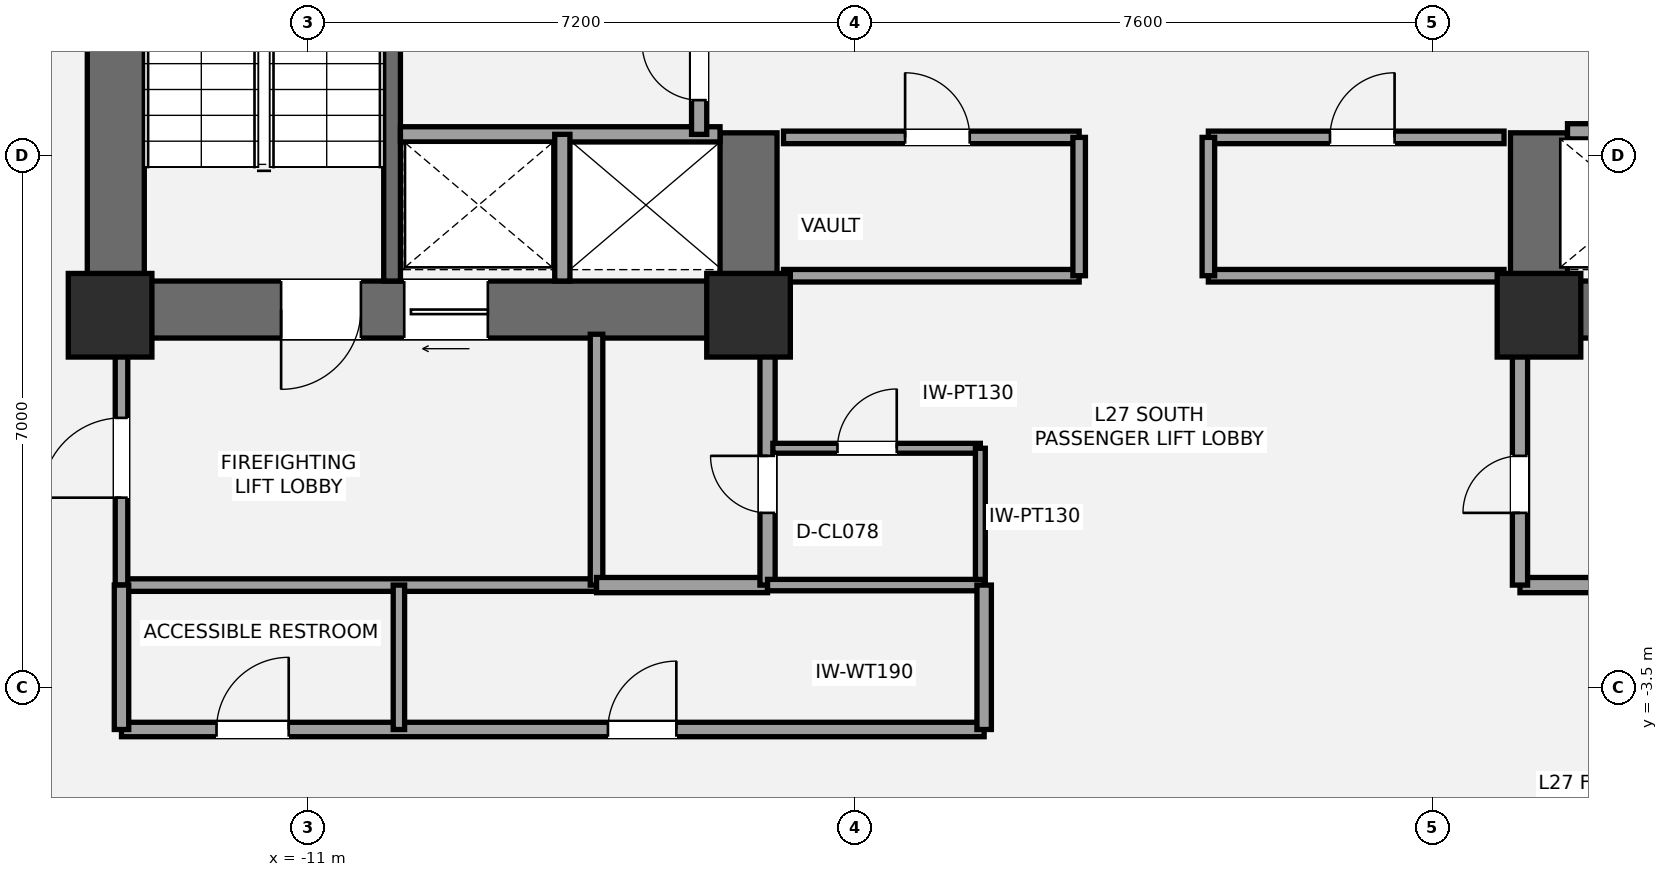
"""IFC4 building model, lengths in metres.
Left out: names, types, materials, properties, quantities, classifications, styles, units other than length and angle.
Written with IfcOpenShell. Run it as: python <this file> out.ifc"""

import sys

from ifc_helpers import new_model, si_unit, direction, frame, frame_2d, origin, origin_2d, place, context, subcontext, project, spatial, rectangle, extrude, element, fill, save


model = new_model("IFC4")
c1 = context("Model", 3, precision=1e-05, world=origin(), true_north=direction((0.0, 1.0)))
c2 = subcontext(c1, "Body", "Model", "MODEL_VIEW")
j1 = project(units=[si_unit("LENGTHUNIT", "METRE"), si_unit("PLANEANGLEUNIT", "RADIAN")], contexts=[c1])
p1 = place(None, origin())
s1 = spatial("IfcSite", under=j1, at=p1, CompositionType="ELEMENT")
p2 = place(p1, origin())
s2 = spatial("IfcBuilding", under=s1, at=p2, CompositionType="ELEMENT")
p3 = place(p2, frame((0.0, 0.0, 103.6)))
s3 = spatial("IfcBuildingStorey", under=s2, at=p3, CompositionType="ELEMENT", Elevation=103.6)
p4 = place(p3, frame((-13.525, 1.1, 0.0), z_axis=(0.0, 0.0, 1.0), x_axis=(0.0, 1.0, 0.0)))
e1 = element("IfcWall", 1, at=p4, inside=s3, PredefinedType="SHEAR", context=c2, shape_type="SweptSolid", body=[
    extrude(rectangle(XDim=8.65, YDim=0.75, at=frame_2d((4.325, 0.0))), origin(), (0.0, 0.0, 1.0), 3.5),
])
p5 = place(p3, frame((-4.825, 1.475, 0.0), z_axis=(0.0, 0.0, 1.0), x_axis=(-1.0, 0.0, 0.0)))
e2 = element("IfcWall", 2, at=p5, inside=s3, PredefinedType="SHEAR", context=c2, shape_type="SweptSolid", body=[
    extrude(rectangle(XDim=9.075, YDim=0.75, at=frame_2d((4.538, 0.0))), origin(), (0.0, 0.0, 1.0), 3.5),
])
p6 = place(p5, frame((5.475, 0.0, 0.0)))
e3 = element("IfcOpeningElement", 3, at=p6, cuts=e2, PredefinedType="OPENING", context=c2, shape_type="SweptSolid", body=[
    extrude(rectangle(XDim=1.05, YDim=2.15, at=frame_2d((0.525, 1.075))), frame((0.0, 0.385, 0.0), z_axis=(0.0, -1.0, 0.0), x_axis=(1.0, 0.0, 0.0)), (0.0, 0.0, 1.0), 0.77),
])
p7 = place(p5, frame((3.805, 0.0, 0.0)))
e4 = element("IfcOpeningElement", 4, at=p7, cuts=e2, PredefinedType="OPENING", context=c2, shape_type="SweptSolid", body=[
    extrude(rectangle(XDim=1.1, YDim=2.2, at=frame_2d((0.55, 1.1))), frame((0.0, 0.385, 0.0), z_axis=(0.0, -1.0, 0.0), x_axis=(1.0, 0.0, 0.0)), (0.0, 0.0, 1.0), 0.77),
])
p8 = place(p3, frame((-5.2, 1.1, 0.0), z_axis=(0.0, 0.0, 1.0), x_axis=(0.0, 1.0, 0.0)))
e5 = element("IfcWall", 5, at=p8, inside=s3, PredefinedType="SHEAR", context=c2, shape_type="SweptSolid", body=[
    extrude(rectangle(XDim=2.7, YDim=0.75, at=frame_2d((1.35, 0.0))), origin(), (0.0, 0.0, 1.0), 3.5),
])
p9 = place(p3, frame((-9.89, 1.85, 0.0), z_axis=(0.0, 0.0, 1.0), x_axis=(0.0, 1.0, 0.0)))
e6 = element("IfcWall", 6, at=p9, inside=s3, PredefinedType="SHEAR", context=c2, shape_type="SweptSolid", body=[
    extrude(rectangle(XDim=7.15, YDim=0.22, at=frame_2d((3.575, 0.0))), origin(), (0.0, 0.0, 1.0), 3.5),
])
p10 = place(p3, frame((13.9, 1.475, 0.0), z_axis=(0.0, 0.0, 1.0), x_axis=(-1.0, 0.0, 0.0)))
e7 = element("IfcWall", 7, at=p10, inside=s3, PredefinedType="SHEAR", context=c2, shape_type="SweptSolid", body=[
    extrude(rectangle(XDim=9.075, YDim=0.75, at=frame_2d((4.538, 0.0))), origin(), (0.0, 0.0, 1.0), 3.5),
])
p11 = place(p10, frame((2.55, 0.0, 0.0)))
e8 = element("IfcOpeningElement", 8, at=p11, cuts=e7, PredefinedType="OPENING", context=c2, shape_type="SweptSolid", body=[
    extrude(rectangle(XDim=1.05, YDim=2.15, at=frame_2d((0.525, 1.075))), frame((0.0, 0.385, 0.0), z_axis=(0.0, -1.0, 0.0), x_axis=(1.0, 0.0, 0.0)), (0.0, 0.0, 1.0), 0.77),
])
p12 = place(p10, frame((4.55, 0.0, 0.0)))
e9 = element("IfcOpeningElement", 9, at=p12, cuts=e7, PredefinedType="OPENING", context=c2, shape_type="SweptSolid", body=[
    extrude(rectangle(XDim=1.1, YDim=2.2, at=frame_2d((0.55, 1.1))), frame((0.0, 0.385, 0.0), z_axis=(0.0, -1.0, 0.0), x_axis=(1.0, 0.0, 0.0)), (0.0, 0.0, 1.0), 0.77),
])
p13 = place(p3, frame((5.2, 1.1, 0.0), z_axis=(0.0, 0.0, 1.0), x_axis=(0.0, 1.0, 0.0)))
e10 = element("IfcWall", 10, at=p13, inside=s3, PredefinedType="SHEAR", context=c2, shape_type="SweptSolid", body=[
    extrude(rectangle(XDim=2.7, YDim=0.75, at=frame_2d((1.35, 0.0))), origin(), (0.0, 0.0, 1.0), 3.5),
])
for number, where, z_axis, x_axis in (
    (11, (-13.6, 1.4, 0.0), (0.0, 0.0, 1.0), (1.0, 0.0, 0.0)),
    (12, (-5.2, 1.4, 0.0), (0.0, 0.0, 1.0), (1.0, 0.0, 0.0)),
    (13, (5.2, 1.4, 0.0), (0.0, 0.0, 1.0), (1.0, 0.0, 0.0)),
):
    element("IfcColumn", number, at=place(p3, frame(where, z_axis=z_axis, x_axis=x_axis)), inside=s3, PredefinedType="COLUMN", context=c2, shape_type="SweptSolid", body=[
        extrude(rectangle(XDim=1.1, YDim=1.1, at=origin_2d()), origin(), (0.0, 0.0, 1.0), 3.5),
    ])
p14 = place(p3, frame((-13.45, -2.15, 0.0), z_axis=(0.0, 0.0, 1.0), x_axis=(1.0, 0.0, 0.0)))
e14 = element("IfcWall", 14, at=p14, inside=s3, PredefinedType="PARTITIONING", context=c2, shape_type="SweptSolid", body=[
    extrude(rectangle(XDim=6.25, YDim=0.165, at=frame_2d((3.125, 0.0))), origin(), (0.0, 0.0, 1.0), 2.763),
])
p15 = place(p3, frame((-13.45, -2.15, 0.0), z_axis=(0.0, 0.0, 1.0), x_axis=(0.0, 1.0, 0.0)))
e15 = element("IfcWall", 15, at=p15, inside=s3, PredefinedType="PARTITIONING", context=c2, shape_type="SweptSolid", body=[
    extrude(rectangle(XDim=3.3, YDim=0.165, at=frame_2d((1.65, 0.0))), origin(), (0.0, 0.0, 1.0), 2.763),
])
p16 = place(p15, frame((1.15, 0.0, 0.0)))
e16 = element("IfcOpeningElement", 16, at=p16, cuts=e15, PredefinedType="OPENING", context=c2, shape_type="SweptSolid", body=[
    extrude(rectangle(XDim=1.05, YDim=2.15, at=frame_2d((0.525, 1.075))), frame((0.0, 0.093, 0.0), z_axis=(0.0, -1.0, 0.0), x_axis=(1.0, 0.0, 0.0)), (0.0, 0.0, 1.0), 0.185),
])
p17 = place(p3, frame((-7.2, -2.15, 0.0), z_axis=(0.0, 0.0, 1.0), x_axis=(0.0, 1.0, 0.0)))
e17 = element("IfcWall", 17, at=p17, inside=s3, PredefinedType="PARTITIONING", context=c2, shape_type="SweptSolid", body=[
    extrude(rectangle(XDim=3.3, YDim=0.165, at=frame_2d((1.65, 0.0))), origin(), (0.0, 0.0, 1.0), 2.763),
])
p18 = place(p3, frame((-7.2, -2.15, 0.0), z_axis=(0.0, 0.0, 1.0), x_axis=(1.0, 0.0, 0.0)))
e18 = element("IfcWall", 18, at=p18, inside=s3, PredefinedType="SOLIDWALL", context=c2, shape_type="SweptSolid", body=[
    extrude(rectangle(XDim=2.25, YDim=0.2, at=frame_2d((1.125, 0.0))), origin(), (0.0, 0.0, 1.0), 2.763),
])
p19 = place(p3, frame((-4.95, -2.15, 0.0), z_axis=(0.0, 0.0, 1.0), x_axis=(0.0, 1.0, 0.0)))
e19 = element("IfcWall", 19, at=p19, inside=s3, PredefinedType="SOLIDWALL", context=c2, shape_type="SweptSolid", body=[
    extrude(rectangle(XDim=3.3, YDim=0.2, at=frame_2d((1.65, 0.0))), origin(), (0.0, 0.0, 1.0), 2.763),
])
p20 = place(p19, frame((0.95, 0.0, 0.0)))
e20 = element("IfcOpeningElement", 20, at=p20, cuts=e19, PredefinedType="OPENING", context=c2, shape_type="SweptSolid", body=[
    extrude(rectangle(XDim=0.75, YDim=2.1, at=frame_2d((0.375, 1.05))), frame((0.0, 0.11, 0.0), z_axis=(0.0, -1.0, 0.0), x_axis=(1.0, 0.0, 0.0)), (0.0, 0.0, 1.0), 0.22),
])
p21 = place(p3, frame((4.95, -2.15, 0.0), z_axis=(0.0, 0.0, 1.0), x_axis=(1.0, 0.0, 0.0)))
e21 = element("IfcWall", 21, at=p21, inside=s3, PredefinedType="SOLIDWALL", context=c2, shape_type="SweptSolid", body=[
    extrude(rectangle(XDim=2.25, YDim=0.2, at=frame_2d((1.125, 0.0))), origin(), (0.0, 0.0, 1.0), 2.763),
])
p22 = place(p3, frame((4.95, -2.15, 0.0), z_axis=(0.0, 0.0, 1.0), x_axis=(0.0, 1.0, 0.0)))
e22 = element("IfcWall", 22, at=p22, inside=s3, PredefinedType="SOLIDWALL", context=c2, shape_type="SweptSolid", body=[
    extrude(rectangle(XDim=3.3, YDim=0.2, at=frame_2d((1.65, 0.0))), origin(), (0.0, 0.0, 1.0), 3.31),
])
p23 = place(p22, frame((0.95, 0.0, 0.0)))
e23 = element("IfcOpeningElement", 23, at=p23, cuts=e22, PredefinedType="OPENING", context=c2, shape_type="SweptSolid", body=[
    extrude(rectangle(XDim=0.75, YDim=2.1, at=frame_2d((0.375, 1.05))), frame((0.0, 0.11, 0.0), z_axis=(0.0, -1.0, 0.0), x_axis=(1.0, 0.0, 0.0)), (0.0, 0.0, 1.0), 0.22),
])
p24 = place(p3, frame((-4.88, -0.35, 0.0), z_axis=(0.0, 0.0, 1.0), x_axis=(1.0, 0.0, 0.0)))
e24 = element("IfcWall", 24, at=p24, inside=s3, PredefinedType="PARTITIONING", context=c2, shape_type="SweptSolid", body=[
    extrude(rectangle(XDim=2.73, YDim=0.13, at=frame_2d((1.365, 0.0))), origin(), (0.0, 0.0, 1.0), 2.763),
])
p25 = place(p24, frame((0.85, 0.0, 0.0)))
e25 = element("IfcOpeningElement", 25, at=p25, cuts=e24, PredefinedType="OPENING", context=c2, shape_type="SweptSolid", body=[
    extrude(rectangle(XDim=0.78, YDim=2.1, at=frame_2d((0.39, 1.05))), frame((0.0, 0.075, 0.0), z_axis=(0.0, -1.0, 0.0), x_axis=(1.0, 0.0, 0.0)), (0.0, 0.0, 1.0), 0.15),
])
p26 = place(p3, frame((-2.15, -2.15, 0.0), z_axis=(0.0, 0.0, 1.0), x_axis=(0.0, 1.0, 0.0)))
e26 = element("IfcWall", 26, at=p26, inside=s3, PredefinedType="PARTITIONING", context=c2, shape_type="SweptSolid", body=[
    extrude(rectangle(XDim=1.8, YDim=0.13, at=frame_2d((0.9, 0.0))), origin(), (0.0, 0.0, 1.0), 3.31),
])
p27 = place(p3, frame((-9.78, 3.78, 0.0), z_axis=(0.0, 0.0, 1.0), x_axis=(1.0, 0.0, 0.0)))
e27 = element("IfcWall", 27, at=p27, inside=s3, PredefinedType="SOLIDWALL", context=c2, shape_type="SweptSolid", body=[
    extrude(rectangle(XDim=4.205, YDim=0.2, at=frame_2d((2.103, 0.0))), origin(), (0.0, 0.0, 1.0), 3.31),
])
p28 = place(p3, frame((-7.65, 1.85, 0.0), z_axis=(0.0, 0.0, 1.0), x_axis=(0.0, 1.0, 0.0)))
e28 = element("IfcWall", 28, at=p28, inside=s3, PredefinedType="SOLIDWALL", context=c2, shape_type="SweptSolid", body=[
    extrude(rectangle(XDim=1.93, YDim=0.2, at=frame_2d((0.965, 0.0))), origin(), (0.0, 0.0, 1.0), 3.31),
])
p29 = place(p3, frame((-5.85, 3.78, 0.0), z_axis=(0.0, 0.0, 1.0), x_axis=(0.0, 1.0, 0.0)))
e29 = element("IfcWall", 29, at=p29, inside=s3, PredefinedType="SOLIDWALL", context=c2, shape_type="SweptSolid", body=[
    extrude(rectangle(XDim=1.69, YDim=0.2, at=frame_2d((0.845, 0.0))), origin(), (0.0, 0.0, 1.0), 3.31),
])
p30 = place(p29, frame((0.45, 0.0, 0.0)))
e30 = element("IfcOpeningElement", 30, at=p30, cuts=e29, PredefinedType="OPENING", context=c2, shape_type="SweptSolid", body=[
    extrude(rectangle(XDim=0.75, YDim=2.1, at=frame_2d((0.375, 1.05))), frame((0.0, 0.11, 0.0), z_axis=(0.0, -1.0, 0.0), x_axis=(1.0, 0.0, 0.0)), (0.0, 0.0, 1.0), 0.22),
])
p31 = place(p3, frame((5.575, 3.82, 0.0), z_axis=(0.0, 0.0, 1.0), x_axis=(1.0, 0.0, 0.0)))
e31 = element("IfcWall", 31, at=p31, inside=s3, PredefinedType="SOLIDWALL", context=c2, shape_type="SweptSolid", body=[
    extrude(rectangle(XDim=4.205, YDim=0.2, at=frame_2d((2.103, 0.0))), origin(), (0.0, 0.0, 1.0), 3.31),
])
p32 = place(p31, frame((0.65, 0.0, 0.0)))
e32 = element("IfcOpeningElement", 32, at=p32, cuts=e31, PredefinedType="OPENING", context=c2, shape_type="SweptSolid", body=[
    extrude(rectangle(XDim=1.2, YDim=2.2, at=frame_2d((0.6, 1.1))), frame((0.0, 0.11, 0.0), z_axis=(0.0, -1.0, 0.0), x_axis=(1.0, 0.0, 0.0)), (0.0, 0.0, 1.0), 0.22),
])
p33 = place(p3, frame((-4.74, 1.92, 0.0), z_axis=(0.0, 0.0, 1.0), x_axis=(1.0, 0.0, 0.0)))
e33 = element("IfcWall", 33, at=p33, inside=s3, PredefinedType="PARTITIONING", context=c2, shape_type="SweptSolid", body=[
    extrude(rectangle(XDim=3.89, YDim=0.165, at=frame_2d((1.945, 0.0))), origin(), (0.0, 0.0, 1.0), 2.3),
])
p34 = place(p3, frame((-4.74, 3.74, 0.0), z_axis=(0.0, 0.0, 1.0), x_axis=(1.0, 0.0, 0.0)))
e34 = element("IfcWall", 34, at=p34, inside=s3, PredefinedType="PARTITIONING", context=c2, shape_type="SweptSolid", body=[
    extrude(rectangle(XDim=3.89, YDim=0.165, at=frame_2d((1.945, 0.0))), origin(), (0.0, 0.0, 1.0), 3.31),
])
p35 = place(p34, frame((1.6, 0.0, 0.0)))
e35 = element("IfcOpeningElement", 35, at=p35, cuts=e34, PredefinedType="OPENING", context=c2, shape_type="SweptSolid", body=[
    extrude(rectangle(XDim=0.85, YDim=2.1, at=frame_2d((0.425, 1.05))), frame((0.0, 0.093, 0.0), z_axis=(0.0, -1.0, 0.0), x_axis=(1.0, 0.0, 0.0)), (0.0, 0.0, 1.0), 0.185),
])
p36 = place(p3, frame((-0.85, 1.92, 0.0), z_axis=(0.0, 0.0, 1.0), x_axis=(0.0, 1.0, 0.0)))
e36 = element("IfcWall", 36, at=p36, inside=s3, PredefinedType="PARTITIONING", context=c2, shape_type="SweptSolid", body=[
    extrude(rectangle(XDim=1.82, YDim=0.165, at=frame_2d((0.91, 0.0))), origin(), (0.0, 0.0, 1.0), 3.31),
])
p37 = place(p3, frame((0.85, 1.92, 0.0), z_axis=(0.0, 0.0, 1.0), x_axis=(1.0, 0.0, 0.0)))
e37 = element("IfcWall", 37, at=p37, inside=s3, PredefinedType="PARTITIONING", context=c2, shape_type="SweptSolid", body=[
    extrude(rectangle(XDim=3.89, YDim=0.165, at=frame_2d((1.945, 0.0))), origin(), (0.0, 0.0, 1.0), 2.3),
])
p38 = place(p3, frame((0.85, 3.74, 0.0), z_axis=(0.0, 0.0, 1.0), x_axis=(1.0, 0.0, 0.0)))
e38 = element("IfcWall", 38, at=p38, inside=s3, PredefinedType="PARTITIONING", context=c2, shape_type="SweptSolid", body=[
    extrude(rectangle(XDim=3.89, YDim=0.165, at=frame_2d((1.945, 0.0))), origin(), (0.0, 0.0, 1.0), 3.31),
])
p39 = place(p38, frame((1.6, 0.0, 0.0)))
e39 = element("IfcOpeningElement", 39, at=p39, cuts=e38, PredefinedType="OPENING", context=c2, shape_type="SweptSolid", body=[
    extrude(rectangle(XDim=0.85, YDim=2.1, at=frame_2d((0.425, 1.05))), frame((0.0, 0.093, 0.0), z_axis=(0.0, -1.0, 0.0), x_axis=(1.0, 0.0, 0.0)), (0.0, 0.0, 1.0), 0.185),
])
p40 = place(p3, frame((0.85, 1.92, 0.0), z_axis=(0.0, 0.0, 1.0), x_axis=(0.0, 1.0, 0.0)))
e40 = element("IfcWall", 40, at=p40, inside=s3, PredefinedType="PARTITIONING", context=c2, shape_type="SweptSolid", body=[
    extrude(rectangle(XDim=1.82, YDim=0.165, at=frame_2d((0.91, 0.0))), origin(), (0.0, 0.0, 1.0), 3.31),
])
p41 = place(p3, frame((-13.45, -4.05, 0.0), z_axis=(0.0, 0.0, 1.0), x_axis=(1.0, 0.0, 0.0)))
e41 = element("IfcWall", 41, at=p41, inside=s3, PredefinedType="PLUMBINGWALL", context=c2, shape_type="SweptSolid", body=[
    extrude(rectangle(XDim=11.35, YDim=0.19, at=frame_2d((5.675, 0.0))), origin(), (0.0, 0.0, 1.0), 2.763),
])
p42 = place(p41, frame((1.25, 0.0, 0.0)))
e42 = element("IfcOpeningElement", 42, at=p42, cuts=e41, PredefinedType="OPENING", context=c2, shape_type="SweptSolid", body=[
    extrude(rectangle(XDim=0.95, YDim=2.15, at=frame_2d((0.475, 1.075))), frame((0.0, 0.105, 0.0), z_axis=(0.0, -1.0, 0.0), x_axis=(1.0, 0.0, 0.0)), (0.0, 0.0, 1.0), 0.21),
])
p43 = place(p41, frame((6.4, 0.0, 0.0)))
e43 = element("IfcOpeningElement", 43, at=p43, cuts=e41, PredefinedType="OPENING", context=c2, shape_type="SweptSolid", body=[
    extrude(rectangle(XDim=0.9, YDim=2.1, at=frame_2d((0.45, 1.05))), frame((0.0, 0.105, 0.0), z_axis=(0.0, -1.0, 0.0), x_axis=(1.0, 0.0, 0.0)), (0.0, 0.0, 1.0), 0.21),
])
p44 = place(p3, frame((-4.95, -2.15, 0.0), z_axis=(0.0, 0.0, 1.0), x_axis=(1.0, 0.0, 0.0)))
e44 = element("IfcWall", 44, at=p44, inside=s3, PredefinedType="PLUMBINGWALL", context=c2, shape_type="SweptSolid", body=[
    extrude(rectangle(XDim=2.85, YDim=0.15, at=frame_2d((1.425, 0.0))), origin(), (0.0, 0.0, 1.0), 2.763),
])
p45 = place(p3, frame((-13.45, -4.05, 0.0), z_axis=(0.0, 0.0, 1.0), x_axis=(0.0, 1.0, 0.0)))
e45 = element("IfcWall", 45, at=p45, inside=s3, PredefinedType="PLUMBINGWALL", context=c2, shape_type="SweptSolid", body=[
    extrude(rectangle(XDim=1.9, YDim=0.19, at=frame_2d((0.95, 0.0))), origin(), (0.0, 0.0, 1.0), 2.763),
])
p46 = place(p3, frame((-2.1, -4.05, 0.0), z_axis=(0.0, 0.0, 1.0), x_axis=(0.0, 1.0, 0.0)))
e46 = element("IfcWall", 46, at=p46, inside=s3, PredefinedType="PLUMBINGWALL", context=c2, shape_type="SweptSolid", body=[
    extrude(rectangle(XDim=1.9, YDim=0.19, at=frame_2d((0.95, 0.0))), origin(), (0.0, 0.0, 1.0), 3.31),
])
p47 = place(p3, frame((-9.8, -4.05, 0.0), z_axis=(0.0, 0.0, 1.0), x_axis=(0.0, 1.0, 0.0)))
e47 = element("IfcWall", 47, at=p47, inside=s3, PredefinedType="PLUMBINGWALL", context=c2, shape_type="SweptSolid", body=[
    extrude(rectangle(XDim=1.9, YDim=0.15, at=frame_2d((0.95, 0.0))), origin(), (0.0, 0.0, 1.0), 3.31),
])
p48 = place(p6, origin())
e48 = element("IfcDoor", 48, at=p48, inside=s3, OperationType="SINGLE_SWING_RIGHT", PredefinedType="DOOR", context=c2, shape_type="SweptSolid", body=[
    extrude(rectangle(XDim=1.05, YDim=2.15, at=frame_2d((0.525, 1.075))), frame((0.0, 0.025, 0.0), z_axis=(0.0, -1.0, 0.0), x_axis=(1.0, 0.0, 0.0)), (0.0, 0.0, 1.0), 0.05),
])
fill(e3, e48)
p49 = place(p16, origin())
e49 = element("IfcDoor", 49, at=p49, inside=s3, OperationType="SINGLE_SWING_LEFT", PredefinedType="DOOR", context=c2, shape_type="SweptSolid", body=[
    extrude(rectangle(XDim=1.05, YDim=2.15, at=frame_2d((0.525, 1.075))), frame((0.0, 0.025, 0.0), z_axis=(0.0, -1.0, 0.0), x_axis=(1.0, 0.0, 0.0)), (0.0, 0.0, 1.0), 0.05),
])
fill(e16, e49)
p50 = place(p20, origin())
e50 = element("IfcDoor", 50, at=p50, inside=s3, OperationType="SINGLE_SWING_RIGHT", PredefinedType="DOOR", context=c2, shape_type="SweptSolid", body=[
    extrude(rectangle(XDim=0.75, YDim=2.1, at=frame_2d((0.375, 1.05))), frame((0.0, 0.025, 0.0), z_axis=(0.0, -1.0, 0.0), x_axis=(1.0, 0.0, 0.0)), (0.0, 0.0, 1.0), 0.05),
])
fill(e20, e50)
p51 = place(p23, origin())
e51 = element("IfcDoor", 51, at=p51, inside=s3, OperationType="SINGLE_SWING_LEFT", PredefinedType="DOOR", context=c2, shape_type="SweptSolid", body=[
    extrude(rectangle(XDim=0.75, YDim=2.1, at=frame_2d((0.375, 1.05))), frame((0.0, 0.025, 0.0), z_axis=(0.0, -1.0, 0.0), x_axis=(1.0, 0.0, 0.0)), (0.0, 0.0, 1.0), 0.05),
])
fill(e23, e51)
p52 = place(p25, origin())
e52 = element("IfcDoor", 52, at=p52, inside=s3, OperationType="SINGLE_SWING_RIGHT", PredefinedType="DOOR", context=c2, shape_type="SweptSolid", body=[
    extrude(rectangle(XDim=0.78, YDim=2.1, at=frame_2d((0.39, 1.05))), frame((0.0, 0.025, 0.0), z_axis=(0.0, -1.0, 0.0), x_axis=(1.0, 0.0, 0.0)), (0.0, 0.0, 1.0), 0.05),
])
fill(e25, e52)
p53 = place(p7, origin())
e53 = element("IfcDoor", 53, at=p53, inside=s3, OperationType="SLIDING_TO_LEFT", PredefinedType="DOOR", context=c2, shape_type="SweptSolid", body=[
    extrude(rectangle(XDim=1.1, YDim=2.2, at=frame_2d((0.55, 1.1))), frame((0.0, 0.025, 0.0), z_axis=(0.0, -1.0, 0.0), x_axis=(1.0, 0.0, 0.0)), (0.0, 0.0, 1.0), 0.05),
])
fill(e4, e53)
p54 = place(p30, origin())
e54 = element("IfcDoor", 54, at=p54, inside=s3, OperationType="SINGLE_SWING_RIGHT", PredefinedType="DOOR", context=c2, shape_type="SweptSolid", body=[
    extrude(rectangle(XDim=0.75, YDim=2.1, at=frame_2d((0.375, 1.05))), frame((0.0, 0.025, 0.0), z_axis=(0.0, -1.0, 0.0), x_axis=(1.0, 0.0, 0.0)), (0.0, 0.0, 1.0), 0.05),
])
fill(e30, e54)
p55 = place(p35, origin())
e55 = element("IfcDoor", 55, at=p55, inside=s3, OperationType="SINGLE_SWING_LEFT", PredefinedType="DOOR", context=c2, shape_type="SweptSolid", body=[
    extrude(rectangle(XDim=0.85, YDim=2.1, at=frame_2d((0.425, 1.05))), frame((0.0, 0.025, 0.0), z_axis=(0.0, -1.0, 0.0), x_axis=(1.0, 0.0, 0.0)), (0.0, 0.0, 1.0), 0.05),
])
fill(e35, e55)
p56 = place(p39, origin())
e56 = element("IfcDoor", 56, at=p56, inside=s3, OperationType="SINGLE_SWING_RIGHT", PredefinedType="DOOR", context=c2, shape_type="SweptSolid", body=[
    extrude(rectangle(XDim=0.85, YDim=2.1, at=frame_2d((0.425, 1.05))), frame((0.0, 0.025, 0.0), z_axis=(0.0, -1.0, 0.0), x_axis=(1.0, 0.0, 0.0)), (0.0, 0.0, 1.0), 0.05),
])
fill(e39, e56)
p57 = place(p42, origin())
e57 = element("IfcDoor", 57, at=p57, inside=s3, OperationType="SINGLE_SWING_RIGHT", PredefinedType="DOOR", context=c2, shape_type="SweptSolid", body=[
    extrude(rectangle(XDim=0.95, YDim=2.15, at=frame_2d((0.475, 1.075))), frame((0.0, 0.025, 0.0), z_axis=(0.0, -1.0, 0.0), x_axis=(1.0, 0.0, 0.0)), (0.0, 0.0, 1.0), 0.05),
])
fill(e42, e57)
p58 = place(p43, origin())
e58 = element("IfcDoor", 58, at=p58, inside=s3, OperationType="SINGLE_SWING_RIGHT", PredefinedType="DOOR", context=c2, shape_type="SweptSolid", body=[
    extrude(rectangle(XDim=0.9, YDim=2.1, at=frame_2d((0.45, 1.05))), frame((0.0, 0.025, 0.0), z_axis=(0.0, -1.0, 0.0), x_axis=(1.0, 0.0, 0.0)), (0.0, 0.0, 1.0), 0.05),
])
fill(e43, e58)
save(model, sys.argv[1])
